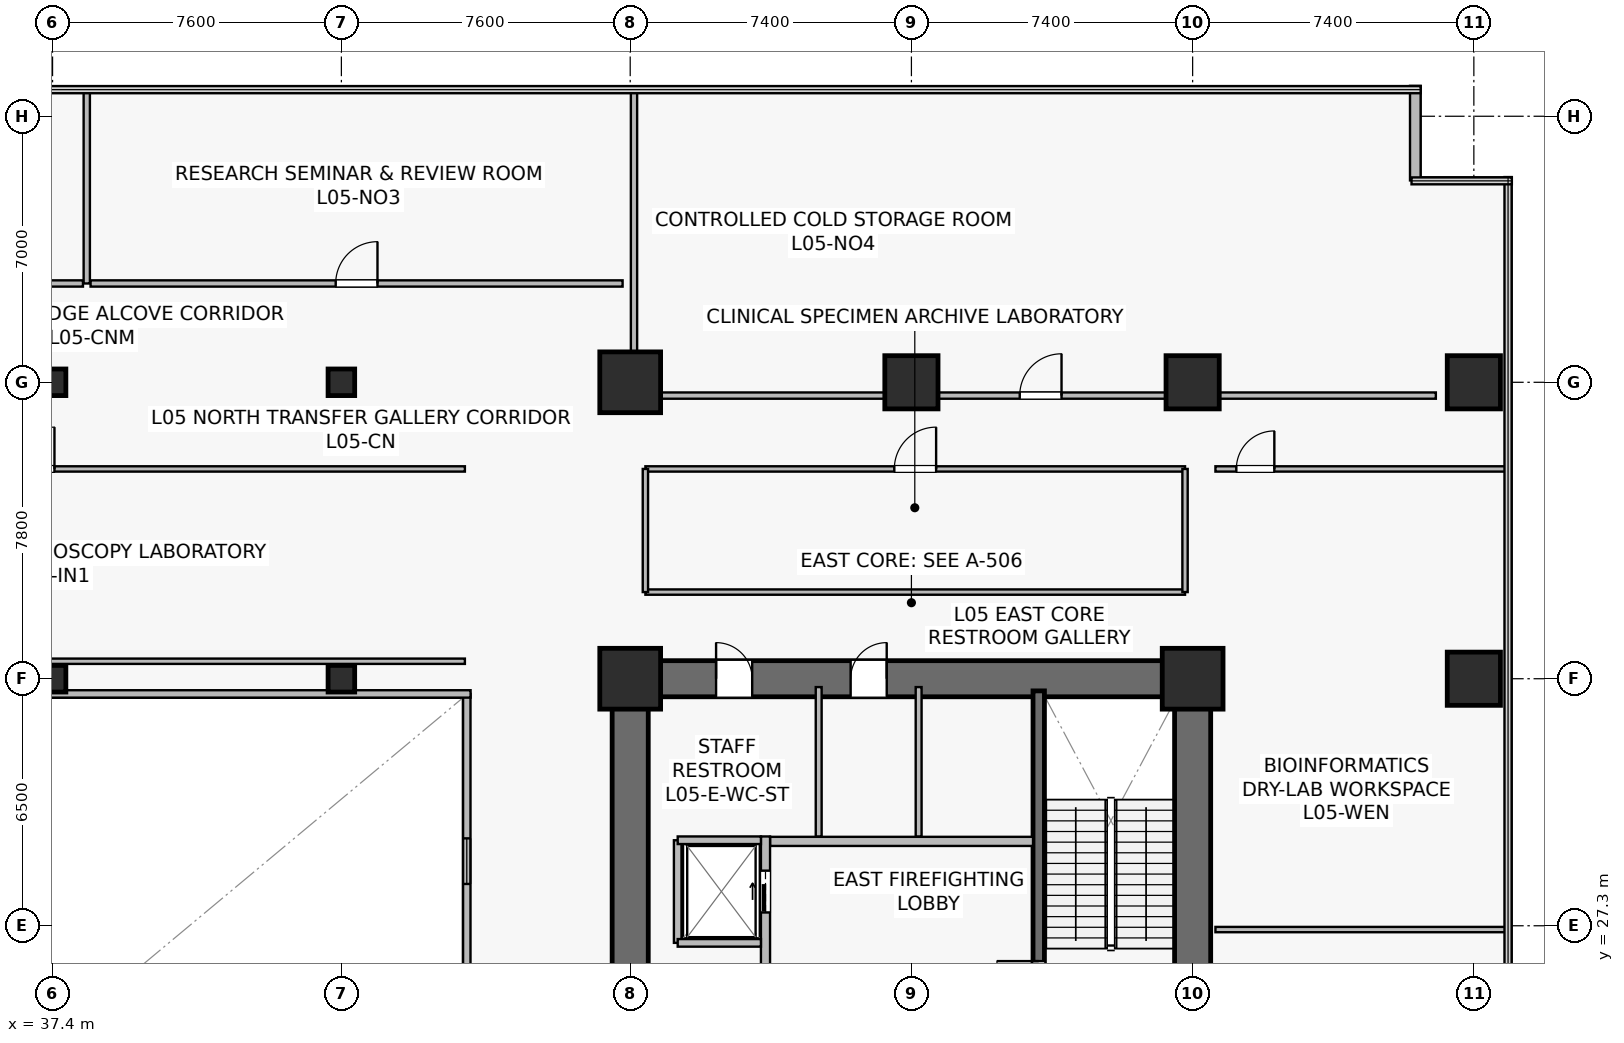
"""IFC4 building model, lengths in metres.
Left out: names, types, materials, properties, quantities, classifications, styles, units other than length and angle.
Written with IfcOpenShell. Run it as: python <this file> out.ifc"""

import sys

from ifc_helpers import new_model, si_unit, direction, frame, frame_2d, origin, origin_2d, place, context, subcontext, project, spatial, rectangle, hollow_rectangle, extrude, source, transform, mapped, element, fill, save


model = new_model("IFC4")
c1 = context("Model", 3, precision=1e-05, world=origin(), true_north=direction((0.0, 1.0)))
c2 = subcontext(c1, "Body", "Model", "MODEL_VIEW")
j1 = project(units=[si_unit("LENGTHUNIT", "METRE"), si_unit("PLANEANGLEUNIT", "RADIAN")], contexts=[c1])
p1 = place(None, origin())
s1 = spatial("IfcSite", under=j1, at=p1, CompositionType="ELEMENT")
p2 = place(p1, origin())
s2 = spatial("IfcBuilding", under=s1, at=p2, CompositionType="ELEMENT")
p3 = place(p2, frame((0.0, 0.0, 19.8)))
s3 = spatial("IfcBuildingStorey", under=s2, at=p3, CompositionType="ELEMENT", Elevation=19.8)
p4 = place(p3, frame((52.125, 33.8, 0.0), z_axis=(0.0, 0.0, 1.0), x_axis=(1.0, 0.0, 0.0)))
e1 = element("IfcWall", 1, at=p4, inside=s3, PredefinedType="SHEAR", context=c2, shape_type="SweptSolid", body=[
    extrude(rectangle(XDim=15.75, YDim=0.95, at=frame_2d((7.875, 0.0))), origin(), (0.0, 0.0, 1.0), 5.08),
])
p5 = place(p4, frame((6.275, 0.0, 0.0)))
e2 = element("IfcOpeningElement", 2, at=p5, cuts=e1, PredefinedType="OPENING", context=c2, shape_type="SweptSolid", body=[
    extrude(rectangle(XDim=0.95, YDim=2.15, at=frame_2d((0.475, 1.075))), frame((0.0, 0.485, 0.0), z_axis=(0.0, -1.0, 0.0), x_axis=(1.0, 0.0, 0.0)), (0.0, 0.0, 1.0), 0.97),
])
p6 = place(p4, frame((2.735, 0.0, 0.0)))
e3 = element("IfcOpeningElement", 3, at=p6, cuts=e1, PredefinedType="OPENING", context=c2, shape_type="SweptSolid", body=[
    extrude(rectangle(XDim=0.95, YDim=2.15, at=frame_2d((0.475, 1.075))), frame((0.0, 0.485, 0.0), z_axis=(0.0, -1.0, 0.0), x_axis=(1.0, 0.0, 0.0)), (0.0, 0.0, 1.0), 0.97),
])
p7 = place(p3, frame((52.6, 15.275, 0.0), z_axis=(0.0, 0.0, 1.0), x_axis=(0.0, 1.0, 0.0)))
e4 = element("IfcWall", 4, at=p7, inside=s3, PredefinedType="SHEAR", context=c2, shape_type="SweptSolid", body=[
    extrude(rectangle(XDim=18.05, YDim=0.95, at=frame_2d((9.025, 0.0))), origin(), (0.0, 0.0, 1.0), 5.08),
])
p8 = place(p7, frame((3.275, 0.0, 0.0)))
e5 = element("IfcOpeningElement", 5, at=p8, cuts=e4, PredefinedType="OPENING", context=c2, shape_type="SweptSolid", body=[
    extrude(rectangle(XDim=1.42, YDim=2.2, at=frame_2d((0.71, 1.1))), frame((0.0, 0.485, 0.0), z_axis=(0.0, -1.0, 0.0), x_axis=(1.0, 0.0, 0.0)), (0.0, 0.0, 1.0), 0.97),
])
p9 = place(p3, frame((67.4, 15.275, 0.0), z_axis=(0.0, 0.0, 1.0), x_axis=(0.0, 1.0, 0.0)))
e6 = element("IfcWall", 6, at=p9, inside=s3, PredefinedType="SHEAR", context=c2, shape_type="SweptSolid", body=[
    extrude(rectangle(XDim=18.05, YDim=0.95, at=frame_2d((9.025, 0.0))), origin(), (0.0, 0.0, 1.0), 5.08),
])
p10 = place(p3, frame((63.35, 24.85, 0.0), z_axis=(0.0, 0.0, 1.0), x_axis=(0.0, 1.0, 0.0)))
e7 = element("IfcWall", 7, at=p10, inside=s3, PredefinedType="SHEAR", context=c2, shape_type="SweptSolid", body=[
    extrude(rectangle(XDim=8.63, YDim=0.3, at=frame_2d((4.315, 0.0))), origin(), (0.0, 0.0, 1.0), 5.08),
])
p11 = place(p10, frame((0.42, 0.0, 0.0)))
e8 = element("IfcOpeningElement", 8, at=p11, cuts=e7, PredefinedType="OPENING", context=c2, shape_type="SweptSolid", body=[
    extrude(rectangle(XDim=1.1, YDim=2.15, at=frame_2d((0.55, 1.075))), frame((0.0, 0.16, 0.0), z_axis=(0.0, -1.0, 0.0), x_axis=(1.0, 0.0, 0.0)), (0.0, 0.0, 1.0), 0.32),
])
m1 = source(origin(), c2, "Body", "SweptSolid", [
    extrude(rectangle(XDim=1.6, YDim=1.6, at=origin_2d()), origin(), (0.0, 0.0, 1.0), 5.4),
])
for number, where, z_axis, x_axis in (
    (9, (52.6, 33.8, 0.0), (0.0, 0.0, 1.0), (1.0, 0.0, 0.0)),
    (10, (67.4, 33.8, 0.0), (0.0, 0.0, 1.0), (1.0, 0.0, 0.0)),
    (11, (52.6, 41.6, 0.0), (0.0, 0.0, 1.0), (1.0, 0.0, 0.0)),
):
    element("IfcColumn", number, at=place(p3, frame(where, z_axis=z_axis, x_axis=x_axis)), inside=s3, PredefinedType="COLUMN", context=c2, shape_type="MappedRepresentation", body=[
        mapped(m1, transform((0.0, 0.0, 0.0), scale=1.0)),
    ])
m2 = source(origin(), c2, "Body", "SweptSolid", [
    extrude(rectangle(XDim=1.4, YDim=1.4, at=origin_2d()), origin(), (0.0, 0.0, 1.0), 5.4),
])
for number, where, z_axis, x_axis in (
    (12, (60.0, 41.6, 0.0), (0.0, 0.0, 1.0), (1.0, 0.0, 0.0)),
    (13, (67.4, 41.6, 0.0), (0.0, 0.0, 1.0), (1.0, 0.0, 0.0)),
    (14, (74.8, 33.8, 0.0), (0.0, 0.0, 1.0), (1.0, 0.0, 0.0)),
    (15, (74.8, 41.6, 0.0), (0.0, 0.0, 1.0), (1.0, 0.0, 0.0)),
):
    element("IfcColumn", number, at=place(p3, frame(where, z_axis=z_axis, x_axis=x_axis)), inside=s3, PredefinedType="COLUMN", context=c2, shape_type="MappedRepresentation", body=[
        mapped(m2, transform((0.0, 0.0, 0.0), scale=1.0)),
    ])
m3 = source(origin(), c2, "Body", "SweptSolid", [
    extrude(hollow_rectangle(XDim=0.7, YDim=0.7, WallThickness=0.032, at=origin_2d()), origin(), (0.0, 0.0, 1.0), 5.4),
])
for number, where, z_axis, x_axis in (
    (16, (37.4, 33.8, 0.0), (0.0, 0.0, 1.0), (1.0, 0.0, 0.0)),
    (17, (37.4, 41.6, 0.0), (0.0, 0.0, 1.0), (1.0, 0.0, 0.0)),
    (18, (45.0, 33.8, 0.0), (0.0, 0.0, 1.0), (1.0, 0.0, 0.0)),
    (19, (45.0, 41.6, 0.0), (0.0, 0.0, 1.0), (1.0, 0.0, 0.0)),
):
    element("IfcColumn", number, at=place(p3, frame(where, z_axis=z_axis, x_axis=x_axis)), inside=s3, PredefinedType="COLUMN", context=c2, shape_type="MappedRepresentation", body=[
        mapped(m3, transform((0.0, 0.0, 0.0), scale=1.0)),
    ])
p12 = place(p3, frame((73.26, 46.912, 0.0), z_axis=(0.0, 0.0, 1.0), x_axis=(0.0, 1.0, 0.0)))
e20 = element("IfcWall", 20, at=p12, inside=s3, PredefinedType="STANDARD", context=c2, shape_type="SweptSolid", body=[
    extrude(rectangle(XDim=2.488, YDim=0.28, at=frame_2d((1.244, 0.0))), origin(), (0.0, 0.0, 1.0), 5.08),
])
p13 = place(p3, frame((56.28, 29.52, 0.0), z_axis=(0.0, 0.0, 1.0), x_axis=(1.0, 0.0, 0.0)))
e21 = element("IfcWall", 21, at=p13, inside=s3, PredefinedType="SOLIDWALL", context=c2, shape_type="SweptSolid", body=[
    extrude(rectangle(XDim=6.92, YDim=0.24, at=frame_2d((3.46, 0.0))), origin(), (0.0, 0.0, 1.0), 4.365),
])
p14 = place(p3, frame((56.16, 22.8, 0.0), z_axis=(0.0, 0.0, 1.0), x_axis=(0.0, 1.0, 0.0)))
e22 = element("IfcWall", 22, at=p14, inside=s3, PredefinedType="SOLIDWALL", context=c2, shape_type="SweptSolid", body=[
    extrude(rectangle(XDim=6.85, YDim=0.24, at=frame_2d((3.425, 0.0))), origin(), (0.0, 0.0, 1.0), 4.165),
])
p15 = place(p14, frame((4.85, 0.0, 0.0)))
e23 = element("IfcOpeningElement", 23, at=p15, cuts=e22, PredefinedType="OPENING", context=c2, shape_type="SweptSolid", body=[
    extrude(rectangle(XDim=1.1, YDim=2.22, at=frame_2d((0.55, 1.11))), frame((0.0, 0.13, 0.0), z_axis=(0.0, -1.0, 0.0), x_axis=(1.0, 0.0, 0.0)), (0.0, 0.0, 1.0), 0.26),
])
p16 = place(p14, frame((1.0, 0.0, 0.0)))
e24 = element("IfcOpeningElement", 24, at=p16, cuts=e22, PredefinedType="OPENING", context=c2, shape_type="SweptSolid", body=[
    extrude(rectangle(XDim=1.2, YDim=2.22, at=frame_2d((0.6, 1.11))), frame((0.0, 0.13, 0.0), z_axis=(0.0, -1.0, 0.0), x_axis=(1.0, 0.0, 0.0)), (0.0, 0.0, 1.0), 0.26),
])
p17 = place(p3, frame((53.85, 26.85, 0.0), z_axis=(0.0, 0.0, 1.0), x_axis=(0.0, 1.0, 0.0)))
e25 = element("IfcWall", 25, at=p17, inside=s3, PredefinedType="SOLIDWALL", context=c2, shape_type="SweptSolid", body=[
    extrude(rectangle(XDim=2.7, YDim=0.2, at=frame_2d((1.35, 0.0))), origin(), (0.0, 0.0, 1.0), 5.08),
])
p18 = place(p3, frame((53.85, 29.55, 0.0), z_axis=(0.0, 0.0, 1.0), x_axis=(1.0, 0.0, 0.0)))
e26 = element("IfcWall", 26, at=p18, inside=s3, PredefinedType="SOLIDWALL", context=c2, shape_type="SweptSolid", body=[
    extrude(rectangle(XDim=2.19, YDim=0.2, at=frame_2d((1.095, 0.0))), origin(), (0.0, 0.0, 1.0), 5.08),
])
p19 = place(p3, frame((53.85, 26.85, 0.0), z_axis=(0.0, 0.0, 1.0), x_axis=(1.0, 0.0, 0.0)))
e27 = element("IfcWall", 27, at=p19, inside=s3, PredefinedType="SOLIDWALL", context=c2, shape_type="SweptSolid", body=[
    extrude(rectangle(XDim=2.19, YDim=0.2, at=frame_2d((1.095, 0.0))), origin(), (0.0, 0.0, 1.0), 4.477),
])
p20 = place(p3, frame((60.19, 29.65, 0.0), z_axis=(0.0, 0.0, 1.0), x_axis=(0.0, 1.0, 0.0)))
e28 = element("IfcWall", 28, at=p20, inside=s3, PredefinedType="PLUMBINGWALL", context=c2, shape_type="SweptSolid", body=[
    extrude(rectangle(XDim=3.93, YDim=0.155, at=frame_2d((1.965, 0.0))), origin(), (0.0, 0.0, 1.0), 4.365),
])
p21 = place(p3, frame((57.56, 29.65, 0.0), z_axis=(0.0, 0.0, 1.0), x_axis=(0.0, 1.0, 0.0)))
e29 = element("IfcWall", 29, at=p21, inside=s3, PredefinedType="PLUMBINGWALL", context=c2, shape_type="SweptSolid", body=[
    extrude(rectangle(XDim=3.93, YDim=0.155, at=frame_2d((1.965, 0.0))), origin(), (0.0, 0.0, 1.0), 5.08),
])
p22 = place(p3, frame((48.3, 15.2, 0.0), z_axis=(0.0, 0.0, 1.0), x_axis=(0.0, 1.0, 0.0)))
e30 = element("IfcWall", 30, at=p22, inside=s3, PredefinedType="SOLIDWALL", context=c2, shape_type="SweptSolid", body=[
    extrude(rectangle(XDim=18.2, YDim=0.195, at=frame_2d((9.1, 0.0))), origin(), (0.0, 0.0, 1.0), 5.08),
])
p23 = place(p22, frame((1.8, 0.0, 0.9)))
e31 = element("IfcOpeningElement", 31, at=p23, cuts=e30, PredefinedType="OPENING", context=c2, shape_type="SweptSolid", body=[
    extrude(rectangle(XDim=1.2, YDim=1.35, at=frame_2d((0.6, 0.675))), frame((0.0, 0.107, 0.0), z_axis=(0.0, -1.0, 0.0), x_axis=(1.0, 0.0, 0.0)), (0.0, 0.0, 1.0), 0.215),
])
p24 = place(p22, frame((13.2, 0.0, 0.9)))
e32 = element("IfcOpeningElement", 32, at=p24, cuts=e30, PredefinedType="OPENING", context=c2, shape_type="SweptSolid", body=[
    extrude(rectangle(XDim=1.2, YDim=1.35, at=frame_2d((0.6, 0.675))), frame((0.0, 0.107, 0.0), z_axis=(0.0, -1.0, 0.0), x_axis=(1.0, 0.0, 0.0)), (0.0, 0.0, 1.0), 0.215),
])
p25 = place(p3, frame((26.4, 33.4, 0.0), z_axis=(0.0, 0.0, 1.0), x_axis=(1.0, 0.0, 0.0)))
e33 = element("IfcWall", 33, at=p25, inside=s3, PredefinedType="SOLIDWALL", context=c2, shape_type="SweptSolid", body=[
    extrude(rectangle(XDim=22.0, YDim=0.195, at=frame_2d((11.0, 0.0))), origin(), (0.0, 0.0, 1.0), 5.08),
])
p26 = place(p3, frame((22.4, 44.2, 0.0), z_axis=(0.0, 0.0, 1.0), x_axis=(1.0, 0.0, 0.0)))
e34 = element("IfcWall", 34, at=p26, inside=s3, PredefinedType="PARTITIONING", context=c2, shape_type="SweptSolid", body=[
    extrude(rectangle(XDim=15.8, YDim=0.165, at=frame_2d((7.9, 0.0))), origin(), (0.0, 0.0, 1.0), 5.08),
])
p27 = place(p26, frame((7.35, 0.0, 0.0)))
e35 = element("IfcOpeningElement", 35, at=p27, cuts=e34, PredefinedType="OPENING", context=c2, shape_type="SweptSolid", body=[
    extrude(rectangle(XDim=1.1, YDim=2.18, at=frame_2d((0.55, 1.09))), frame((0.0, 0.093, 0.0), z_axis=(0.0, -1.0, 0.0), x_axis=(1.0, 0.0, 0.0)), (0.0, 0.0, 1.0), 0.185),
])
p28 = place(p3, frame((38.4, 44.2, 0.0), z_axis=(0.0, 0.0, 1.0), x_axis=(1.0, 0.0, 0.0)))
e36 = element("IfcWall", 36, at=p28, inside=s3, PredefinedType="PARTITIONING", context=c2, shape_type="SweptSolid", body=[
    extrude(rectangle(XDim=14.0, YDim=0.165, at=frame_2d((7.0, 0.0))), origin(), (0.0, 0.0, 1.0), 5.08),
])
p29 = place(p28, frame((6.45, 0.0, 0.0)))
e37 = element("IfcOpeningElement", 37, at=p29, cuts=e36, PredefinedType="OPENING", context=c2, shape_type="SweptSolid", body=[
    extrude(rectangle(XDim=1.1, YDim=2.18, at=frame_2d((0.55, 1.09))), frame((0.0, 0.093, 0.0), z_axis=(0.0, -1.0, 0.0), x_axis=(1.0, 0.0, 0.0)), (0.0, 0.0, 1.0), 0.185),
])
p30 = place(p3, frame((53.0, 41.25, 0.0), z_axis=(0.0, 0.0, 1.0), x_axis=(1.0, 0.0, 0.0)))
e38 = element("IfcWall", 38, at=p30, inside=s3, PredefinedType="PARTITIONING", context=c2, shape_type="SweptSolid", body=[
    extrude(rectangle(XDim=20.8, YDim=0.165, at=frame_2d((10.4, 0.0))), origin(), (0.0, 0.0, 1.0), 4.365),
])
p31 = place(p30, frame((9.85, 0.0, 0.0)))
e39 = element("IfcOpeningElement", 39, at=p31, cuts=e38, PredefinedType="OPENING", context=c2, shape_type="SweptSolid", body=[
    extrude(rectangle(XDim=1.1, YDim=2.18, at=frame_2d((0.55, 1.09))), frame((0.0, 0.093, 0.0), z_axis=(0.0, -1.0, 0.0), x_axis=(1.0, 0.0, 0.0)), (0.0, 0.0, 1.0), 0.185),
])
p32 = place(p3, frame((38.3, 44.2, 0.0), z_axis=(0.0, 0.0, 1.0), x_axis=(0.0, 1.0, 0.0)))
e40 = element("IfcWall", 40, at=p32, inside=s3, PredefinedType="PARTITIONING", context=c2, shape_type="SweptSolid", body=[
    extrude(rectangle(XDim=5.08, YDim=0.165, at=frame_2d((2.54, 0.0))), origin(), (0.0, 0.0, 1.0), 5.08),
])
p33 = place(p3, frame((52.7, 41.25, 0.0), z_axis=(0.0, 0.0, 1.0), x_axis=(0.0, 1.0, 0.0)))
e41 = element("IfcWall", 41, at=p33, inside=s3, PredefinedType="PARTITIONING", context=c2, shape_type="SweptSolid", body=[
    extrude(rectangle(XDim=8.03, YDim=0.165, at=frame_2d((4.015, 0.0))), origin(), (0.0, 0.0, 1.0), 4.165),
])
p34 = place(p3, frame((53.0, 39.32, 0.0), z_axis=(0.0, 0.0, 1.0), x_axis=(1.0, 0.0, 0.0)))
e42 = element("IfcWall", 42, at=p34, inside=s3, PredefinedType="PARTITIONING", context=c2, shape_type="SweptSolid", body=[
    extrude(rectangle(XDim=14.2, YDim=0.14, at=frame_2d((7.1, 0.0))), origin(), (0.0, 0.0, 1.0), 4.365),
])
p35 = place(p34, frame((6.55, 0.0, 0.0)))
e43 = element("IfcOpeningElement", 43, at=p35, cuts=e42, PredefinedType="OPENING", context=c2, shape_type="SweptSolid", body=[
    extrude(rectangle(XDim=1.1, YDim=2.18, at=frame_2d((0.55, 1.09))), frame((0.0, 0.08, 0.0), z_axis=(0.0, -1.0, 0.0), x_axis=(1.0, 0.0, 0.0)), (0.0, 0.0, 1.0), 0.16),
])
p36 = place(p3, frame((53.0, 36.08, 0.0), z_axis=(0.0, 0.0, 1.0), x_axis=(1.0, 0.0, 0.0)))
e44 = element("IfcWall", 44, at=p36, inside=s3, PredefinedType="PARTITIONING", context=c2, shape_type="SweptSolid", body=[
    extrude(rectangle(XDim=14.2, YDim=0.14, at=frame_2d((7.1, 0.0))), origin(), (0.0, 0.0, 1.0), 4.365),
])
p37 = place(p3, frame((53.0, 36.08, 0.0), z_axis=(0.0, 0.0, 1.0), x_axis=(0.0, 1.0, 0.0)))
e45 = element("IfcWall", 45, at=p37, inside=s3, PredefinedType="PARTITIONING", context=c2, shape_type="SweptSolid", body=[
    extrude(rectangle(XDim=3.24, YDim=0.14, at=frame_2d((1.62, 0.0))), origin(), (0.0, 0.0, 1.0), 5.08),
])
p38 = place(p3, frame((67.2, 36.08, 0.0), z_axis=(0.0, 0.0, 1.0), x_axis=(0.0, 1.0, 0.0)))
e46 = element("IfcWall", 46, at=p38, inside=s3, PredefinedType="PARTITIONING", context=c2, shape_type="SweptSolid", body=[
    extrude(rectangle(XDim=3.24, YDim=0.14, at=frame_2d((1.62, 0.0))), origin(), (0.0, 0.0, 1.0), 4.365),
])
p39 = place(p3, frame((26.55, 39.32, 0.0), z_axis=(0.0, 0.0, 1.0), x_axis=(1.0, 0.0, 0.0)))
e47 = element("IfcWall", 47, at=p39, inside=s3, PredefinedType="PARTITIONING", context=c2, shape_type="SweptSolid", body=[
    extrude(rectangle(XDim=21.7, YDim=0.14, at=frame_2d((10.85, 0.0))), origin(), (0.0, 0.0, 1.0), 4.365),
])
p40 = place(p39, frame((9.8, 0.0, 0.0)))
e48 = element("IfcOpeningElement", 48, at=p40, cuts=e47, PredefinedType="OPENING", context=c2, shape_type="SweptSolid", body=[
    extrude(rectangle(XDim=1.1, YDim=2.18, at=frame_2d((0.55, 1.09))), frame((0.0, 0.08, 0.0), z_axis=(0.0, -1.0, 0.0), x_axis=(1.0, 0.0, 0.0)), (0.0, 0.0, 1.0), 0.16),
])
p41 = place(p3, frame((26.55, 34.26, 0.0), z_axis=(0.0, 0.0, 1.0), x_axis=(1.0, 0.0, 0.0)))
e49 = element("IfcWall", 49, at=p41, inside=s3, PredefinedType="PARTITIONING", context=c2, shape_type="SweptSolid", body=[
    extrude(rectangle(XDim=21.7, YDim=0.14, at=frame_2d((10.85, 0.0))), origin(), (0.0, 0.0, 1.0), 4.365),
])
p42 = place(p3, frame((68.0, 27.2, 0.0), z_axis=(0.0, 0.0, 1.0), x_axis=(1.0, 0.0, 0.0)))
e50 = element("IfcWall", 50, at=p42, inside=s3, PredefinedType="PARTITIONING", context=c2, shape_type="SweptSolid", body=[
    extrude(rectangle(XDim=7.65, YDim=0.14, at=frame_2d((3.825, 0.0))), origin(), (0.0, 0.0, 1.0), 4.465),
])
p43 = place(p3, frame((68.0, 39.32, 0.0), z_axis=(0.0, 0.0, 1.0), x_axis=(1.0, 0.0, 0.0)))
e51 = element("IfcWall", 51, at=p43, inside=s3, PredefinedType="PARTITIONING", context=c2, shape_type="SweptSolid", body=[
    extrude(rectangle(XDim=7.65, YDim=0.14, at=frame_2d((3.825, 0.0))), origin(), (0.0, 0.0, 1.0), 4.465),
])
p44 = place(p43, frame((0.55, 0.0, 0.0)))
e52 = element("IfcOpeningElement", 52, at=p44, cuts=e51, PredefinedType="OPENING", context=c2, shape_type="SweptSolid", body=[
    extrude(rectangle(XDim=1.0, YDim=2.15, at=frame_2d((0.5, 1.075))), frame((0.0, 0.08, 0.0), z_axis=(0.0, -1.0, 0.0), x_axis=(1.0, 0.0, 0.0)), (0.0, 0.0, 1.0), 0.16),
])
m4 = source(origin(), c2, "Body", "SweptSolid", [
    extrude(rectangle(XDim=1.2, YDim=1.35, at=frame_2d((0.6, 0.675))), frame((0.0, 0.03, 0.0), z_axis=(0.0, -1.0, 0.0), x_axis=(1.0, 0.0, 0.0)), (0.0, 0.0, 1.0), 0.06),
])
p45 = place(p24, origin())
e53 = element("IfcWindow", 53, at=p45, inside=s3, PartitioningType="SINGLE_PANEL", PredefinedType="WINDOW", context=c2, shape_type="MappedRepresentation", body=[
    mapped(m4, transform((0.0, 0.0, 0.0), scale=1.0)),
])
fill(e32, e53)
m5 = source(origin(), c2, "Body", "SweptSolid", [
    extrude(rectangle(XDim=1.1, YDim=2.15, at=frame_2d((0.55, 1.075))), frame((0.0, 0.025, 0.0), z_axis=(0.0, -1.0, 0.0), x_axis=(1.0, 0.0, 0.0)), (0.0, 0.0, 1.0), 0.05),
])
p46 = place(p11, origin())
e54 = element("IfcDoor", 54, at=p46, inside=s3, OperationType="SINGLE_SWING_RIGHT", PredefinedType="DOOR", context=c2, shape_type="MappedRepresentation", body=[
    mapped(m5, transform((0.0, 0.0, 0.0), scale=1.0)),
])
fill(e8, e54)
m6 = source(origin(), c2, "Body", "SweptSolid", [
    extrude(rectangle(XDim=1.1, YDim=2.22, at=frame_2d((0.55, 1.11))), frame((0.0, 0.025, 0.0), z_axis=(0.0, -1.0, 0.0), x_axis=(1.0, 0.0, 0.0)), (0.0, 0.0, 1.0), 0.05),
])
p47 = place(p15, origin())
e55 = element("IfcDoor", 55, at=p47, inside=s3, OperationType="SLIDING_TO_RIGHT", PredefinedType="USERDEFINED", context=c2, shape_type="MappedRepresentation", body=[
    mapped(m6, transform((0.0, 0.0, 0.0), scale=1.0)),
])
fill(e23, e55)
m7 = source(origin(), c2, "Body", "SweptSolid", [
    extrude(rectangle(XDim=0.95, YDim=2.15, at=frame_2d((0.475, 1.075))), frame((0.0, 0.025, 0.0), z_axis=(0.0, -1.0, 0.0), x_axis=(1.0, 0.0, 0.0)), (0.0, 0.0, 1.0), 0.05),
])
p48 = place(p5, origin())
e56 = element("IfcDoor", 56, at=p48, inside=s3, OperationType="SINGLE_SWING_RIGHT", PredefinedType="DOOR", context=c2, shape_type="MappedRepresentation", body=[
    mapped(m7, transform((0.0, 0.0, 0.0), scale=1.0)),
])
fill(e2, e56)
p49 = place(p6, origin())
e57 = element("IfcDoor", 57, at=p49, inside=s3, OperationType="SINGLE_SWING_LEFT", PredefinedType="DOOR", context=c2, shape_type="MappedRepresentation", body=[
    mapped(m7, transform((0.0, 0.0, 0.0), scale=1.0)),
])
fill(e3, e57)
m8 = source(origin(), c2, "Body", "SweptSolid", [
    extrude(rectangle(XDim=1.1, YDim=2.18, at=frame_2d((0.55, 1.09))), frame((0.0, 0.025, 0.0), z_axis=(0.0, -1.0, 0.0), x_axis=(1.0, 0.0, 0.0)), (0.0, 0.0, 1.0), 0.05),
])
p50 = place(p29, origin())
e58 = element("IfcDoor", 58, at=p50, inside=s3, OperationType="SINGLE_SWING_RIGHT", PredefinedType="DOOR", context=c2, shape_type="MappedRepresentation", body=[
    mapped(m8, transform((0.0, 0.0, 0.0), scale=1.0)),
])
fill(e37, e58)
p51 = place(p31, origin())
e59 = element("IfcDoor", 59, at=p51, inside=s3, OperationType="SINGLE_SWING_RIGHT", PredefinedType="DOOR", context=c2, shape_type="MappedRepresentation", body=[
    mapped(m8, transform((0.0, 0.0, 0.0), scale=1.0)),
])
fill(e39, e59)
p52 = place(p35, origin())
e60 = element("IfcDoor", 60, at=p52, inside=s3, OperationType="SINGLE_SWING_RIGHT", PredefinedType="DOOR", context=c2, shape_type="MappedRepresentation", body=[
    mapped(m8, transform((0.0, 0.0, 0.0), scale=1.0)),
])
fill(e43, e60)
p53 = place(p40, origin())
e61 = element("IfcDoor", 61, at=p53, inside=s3, OperationType="SINGLE_SWING_RIGHT", PredefinedType="DOOR", context=c2, shape_type="MappedRepresentation", body=[
    mapped(m8, transform((0.0, 0.0, 0.0), scale=1.0)),
])
fill(e48, e61)
m9 = source(origin(), c2, "Body", "SweptSolid", [
    extrude(rectangle(XDim=1.0, YDim=2.15, at=frame_2d((0.5, 1.075))), frame((0.0, 0.025, 0.0), z_axis=(0.0, -1.0, 0.0), x_axis=(1.0, 0.0, 0.0)), (0.0, 0.0, 1.0), 0.05),
])
p54 = place(p44, origin())
e62 = element("IfcDoor", 62, at=p54, inside=s3, OperationType="SINGLE_SWING_RIGHT", PredefinedType="DOOR", context=c2, shape_type="MappedRepresentation", body=[
    mapped(m9, transform((0.0, 0.0, 0.0), scale=1.0)),
])
fill(e52, e62)
save(model, sys.argv[1])
